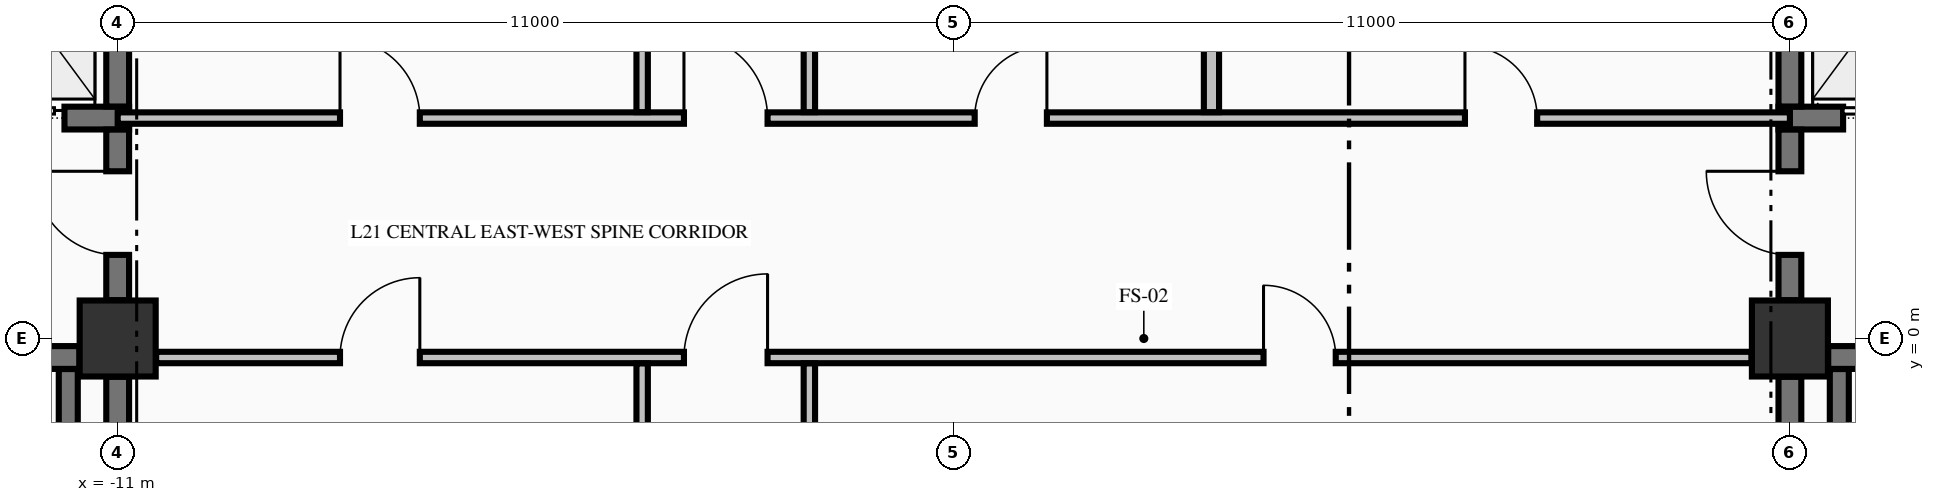
"""IFC4 building model, lengths in metres.
Left out: names, types, materials, properties, quantities, classifications, styles, units other than length and angle.
Written with IfcOpenShell. Run it as: python <this file> out.ifc"""

import sys

from ifc_helpers import new_model, si_unit, direction, frame, frame_2d, origin, origin_2d, place, context, subcontext, project, spatial, rectangle, extrude, element, fill, save


model = new_model("IFC4")
c1 = context("Model", 3, precision=1e-05, world=origin(), true_north=direction((0.0, 1.0)))
c2 = subcontext(c1, "Body", "Model", "MODEL_VIEW")
j1 = project(units=[si_unit("LENGTHUNIT", "METRE"), si_unit("PLANEANGLEUNIT", "RADIAN")], contexts=[c1])
p1 = place(None, origin())
s1 = spatial("IfcSite", under=j1, at=p1, CompositionType="ELEMENT")
p2 = place(p1, origin())
s2 = spatial("IfcBuilding", under=s1, at=p2, CompositionType="ELEMENT")
p3 = place(p2, frame((0.0, 0.0, 86.94)))
s3 = spatial("IfcBuildingStorey", under=s2, at=p3, CompositionType="ELEMENT", Elevation=86.94)
for number, where, z_axis, x_axis in (
    (1, (-11.0, 0.0, -0.425), (0.0, 0.0, 1.0), (1.0, 0.0, 0.0)),
    (2, (11.0, 0.0, -0.425), (0.0, 0.0, 1.0), (1.0, 0.0, 0.0)),
):
    element("IfcColumn", number, at=place(p3, frame(where, z_axis=z_axis, x_axis=x_axis)), inside=s3, PredefinedType="COLUMN", context=c2, shape_type="SweptSolid", body=[
        extrude(rectangle(XDim=1.0, YDim=1.0, at=origin_2d()), origin(), (0.0, 0.0, 1.0), 4.595),
    ])
p4 = place(p3, frame((-19.496, -0.25, 0.0), z_axis=(0.0, 0.0, 1.0), x_axis=(1.0, 0.0, 0.0)))
e3 = element("IfcWall", 3, at=p4, inside=s3, PredefinedType="SHEAR", context=c2, shape_type="SweptSolid", body=[
    extrude(rectangle(XDim=7.992, YDim=0.3, at=frame_2d((3.996, 0.0))), origin(), (0.0, 0.0, 1.0), 4.17),
])
p5 = place(p4, frame((5.796, 0.0, 0.0)))
e4 = element("IfcOpeningElement", 4, at=p5, cuts=e3, PredefinedType="OPENING", context=c2, shape_type="SweptSolid", body=[
    extrude(rectangle(XDim=1.1, YDim=2.15, at=frame_2d((0.55, 1.075))), frame((0.0, 0.16, 0.0), z_axis=(0.0, -1.0, 0.0), x_axis=(1.0, 0.0, 0.0)), (0.0, 0.0, 1.0), 0.32),
])
p6 = place(p3, frame((11.504, -0.25, 0.0), z_axis=(0.0, 0.0, 1.0), x_axis=(1.0, 0.0, 0.0)))
e5 = element("IfcWall", 5, at=p6, inside=s3, PredefinedType="SHEAR", context=c2, shape_type="SweptSolid", body=[
    extrude(rectangle(XDim=3.371, YDim=0.3, at=frame_2d((1.686, 0.0))), origin(), (0.0, 0.0, 1.0), 4.17),
])
p7 = place(p6, frame((1.096, 0.0, 0.0)))
e6 = element("IfcOpeningElement", 6, at=p7, cuts=e5, PredefinedType="OPENING", context=c2, shape_type="SweptSolid", body=[
    extrude(rectangle(XDim=1.1, YDim=2.15, at=frame_2d((0.55, 1.075))), frame((0.0, 0.16, 0.0), z_axis=(0.0, -1.0, 0.0), x_axis=(1.0, 0.0, 0.0)), (0.0, 0.0, 1.0), 0.32),
])
p8 = place(p3, frame((-14.875, 2.9, 0.0), z_axis=(0.0, 0.0, 1.0), x_axis=(1.0, 0.0, 0.0)))
e7 = element("IfcWall", 7, at=p8, inside=s3, PredefinedType="SHEAR", context=c2, shape_type="SweptSolid", body=[
    extrude(rectangle(XDim=4.025, YDim=0.3, at=frame_2d((2.012, 0.0))), origin(), (0.0, 0.0, 1.0), 4.17),
])
p9 = place(p8, frame((2.075, 0.0, 0.0)))
e8 = element("IfcOpeningElement", 8, at=p9, cuts=e7, PredefinedType="OPENING", context=c2, shape_type="SweptSolid", body=[
    extrude(rectangle(XDim=1.1, YDim=2.2, at=frame_2d((0.55, 1.1))), frame((0.0, 0.16, 0.0), z_axis=(0.0, -1.0, 0.0), x_axis=(1.0, 0.0, 0.0)), (0.0, 0.0, 1.0), 0.32),
])
p10 = place(p3, frame((10.85, 2.9, 0.0), z_axis=(0.0, 0.0, 1.0), x_axis=(1.0, 0.0, 0.0)))
e9 = element("IfcWall", 9, at=p10, inside=s3, PredefinedType="SHEAR", context=c2, shape_type="SweptSolid", body=[
    extrude(rectangle(XDim=4.025, YDim=0.3, at=frame_2d((2.012, 0.0))), origin(), (0.0, 0.0, 1.0), 4.17),
])
p11 = place(p10, frame((0.85, 0.0, 0.0)))
e10 = element("IfcOpeningElement", 10, at=p11, cuts=e9, PredefinedType="OPENING", context=c2, shape_type="SweptSolid", body=[
    extrude(rectangle(XDim=1.1, YDim=2.2, at=frame_2d((0.55, 1.1))), frame((0.0, 0.16, 0.0), z_axis=(0.0, -1.0, 0.0), x_axis=(1.0, 0.0, 0.0)), (0.0, 0.0, 1.0), 0.32),
])
p12 = place(p3, frame((-10.494, -0.25, 0.0), z_axis=(0.0, 0.0, 1.0), x_axis=(1.0, 0.0, 0.0)))
e11 = element("IfcWall", 11, at=p12, inside=s3, PredefinedType="PARTITIONING", context=c2, shape_type="SweptSolid", body=[
    extrude(rectangle(XDim=20.988, YDim=0.15, at=frame_2d((10.494, 0.0))), origin(), (0.0, 0.0, 1.0), 4.17),
])
p13 = place(p12, frame((6.944, 0.0, 0.0)))
e12 = element("IfcOpeningElement", 12, at=p13, cuts=e11, PredefinedType="OPENING", context=c2, shape_type="SweptSolid", body=[
    extrude(rectangle(XDim=1.1, YDim=2.15, at=frame_2d((0.55, 1.075))), frame((0.0, 0.085, 0.0), z_axis=(0.0, -1.0, 0.0), x_axis=(1.0, 0.0, 0.0)), (0.0, 0.0, 1.0), 0.17),
])
p14 = place(p12, frame((2.419, 0.0, 0.0)))
e13 = element("IfcOpeningElement", 13, at=p14, cuts=e11, PredefinedType="OPENING", context=c2, shape_type="SweptSolid", body=[
    extrude(rectangle(XDim=1.05, YDim=2.15, at=frame_2d((0.525, 1.075))), frame((0.0, 0.085, 0.0), z_axis=(0.0, -1.0, 0.0), x_axis=(1.0, 0.0, 0.0)), (0.0, 0.0, 1.0), 0.17),
])
p15 = place(p12, frame((14.569, 0.0, 0.0)))
e14 = element("IfcOpeningElement", 14, at=p15, cuts=e11, PredefinedType="OPENING", context=c2, shape_type="SweptSolid", body=[
    extrude(rectangle(XDim=0.95, YDim=2.15, at=frame_2d((0.475, 1.075))), frame((0.0, 0.085, 0.0), z_axis=(0.0, -1.0, 0.0), x_axis=(1.0, 0.0, 0.0)), (0.0, 0.0, 1.0), 0.17),
])
p16 = place(p3, frame((-11.0, 2.9, 0.0), z_axis=(0.0, 0.0, 1.0), x_axis=(1.0, 0.0, 0.0)))
e15 = element("IfcWall", 15, at=p16, inside=s3, PredefinedType="PARTITIONING", context=c2, shape_type="SweptSolid", body=[
    extrude(rectangle(XDim=22.0, YDim=0.15, at=frame_2d((11.0, 0.0))), origin(), (0.0, 0.0, 1.0), 4.17),
])
p17 = place(p16, frame((7.45, 0.0, 0.0)))
e16 = element("IfcOpeningElement", 16, at=p17, cuts=e15, PredefinedType="OPENING", context=c2, shape_type="SweptSolid", body=[
    extrude(rectangle(XDim=1.1, YDim=2.15, at=frame_2d((0.55, 1.075))), frame((0.0, 0.085, 0.0), z_axis=(0.0, -1.0, 0.0), x_axis=(1.0, 0.0, 0.0)), (0.0, 0.0, 1.0), 0.17),
])
p18 = place(p16, frame((2.925, 0.0, 0.0)))
e17 = element("IfcOpeningElement", 17, at=p18, cuts=e15, PredefinedType="OPENING", context=c2, shape_type="SweptSolid", body=[
    extrude(rectangle(XDim=1.05, YDim=2.15, at=frame_2d((0.525, 1.075))), frame((0.0, 0.085, 0.0), z_axis=(0.0, -1.0, 0.0), x_axis=(1.0, 0.0, 0.0)), (0.0, 0.0, 1.0), 0.17),
])
p19 = place(p16, frame((11.275, 0.0, 0.0)))
e18 = element("IfcOpeningElement", 18, at=p19, cuts=e15, PredefinedType="OPENING", context=c2, shape_type="SweptSolid", body=[
    extrude(rectangle(XDim=0.95, YDim=2.15, at=frame_2d((0.475, 1.075))), frame((0.0, 0.085, 0.0), z_axis=(0.0, -1.0, 0.0), x_axis=(1.0, 0.0, 0.0)), (0.0, 0.0, 1.0), 0.17),
])
p20 = place(p16, frame((17.725, 0.0, 0.0)))
e19 = element("IfcOpeningElement", 19, at=p20, cuts=e15, PredefinedType="OPENING", context=c2, shape_type="SweptSolid", body=[
    extrude(rectangle(XDim=0.95, YDim=2.15, at=frame_2d((0.475, 1.075))), frame((0.0, 0.085, 0.0), z_axis=(0.0, -1.0, 0.0), x_axis=(1.0, 0.0, 0.0)), (0.0, 0.0, 1.0), 0.17),
])
p21 = place(p3, frame((-11.65, -9.798, 0.0), z_axis=(0.0, 0.0, 1.0), x_axis=(0.0, 1.0, 0.0)))
e20 = element("IfcWall", 20, at=p21, inside=s3, PredefinedType="SOLIDWALL", context=c2, shape_type="SweptSolid", body=[
    extrude(rectangle(XDim=9.396, YDim=0.25, at=frame_2d((4.698, 0.0))), origin(), (0.0, 0.0, 1.0), 4.17),
])
p22 = place(p3, frame((-11.0, -9.446, 0.0), z_axis=(0.0, 0.0, 1.0), x_axis=(0.0, 1.0, 0.0)))
e21 = element("IfcWall", 21, at=p22, inside=s3, PredefinedType="SHEAR", context=c2, shape_type="SweptSolid", body=[
    extrude(rectangle(XDim=8.942, YDim=0.3, at=frame_2d((4.471, 0.0))), origin(), (0.0, 0.0, 1.0), 4.17),
])
p23 = place(p3, frame((-11.0, 0.504, 0.0), z_axis=(0.0, 0.0, 1.0), x_axis=(0.0, 1.0, 0.0)))
e22 = element("IfcWall", 22, at=p23, inside=s3, PredefinedType="SHEAR", context=c2, shape_type="SweptSolid", body=[
    extrude(rectangle(XDim=2.244, YDim=0.3, at=frame_2d((1.122, 0.0))), origin(), (0.0, 0.0, 1.0), 4.17),
])
p24 = place(p23, frame((0.596, 0.0, 0.0)))
e23 = element("IfcOpeningElement", 23, at=p24, cuts=e22, PredefinedType="OPENING", context=c2, shape_type="SweptSolid", body=[
    extrude(rectangle(XDim=1.1, YDim=2.15, at=frame_2d((0.55, 1.075))), frame((0.0, 0.16, 0.0), z_axis=(0.0, -1.0, 0.0), x_axis=(1.0, 0.0, 0.0)), (0.0, 0.0, 1.0), 0.32),
])
p25 = place(p3, frame((-11.0, 3.052, 0.0), z_axis=(0.0, 0.0, 1.0), x_axis=(0.0, 1.0, 0.0)))
e24 = element("IfcWall", 24, at=p25, inside=s3, PredefinedType="SHEAR", context=c2, shape_type="SweptSolid", body=[
    extrude(rectangle(XDim=2.496, YDim=0.3, at=frame_2d((1.248, 0.0))), origin(), (0.0, 0.0, 1.0), 4.17),
])
p26 = place(p3, frame((11.0, -9.446, 0.0), z_axis=(0.0, 0.0, 1.0), x_axis=(0.0, 1.0, 0.0)))
e25 = element("IfcWall", 25, at=p26, inside=s3, PredefinedType="SHEAR", context=c2, shape_type="SweptSolid", body=[
    extrude(rectangle(XDim=8.942, YDim=0.3, at=frame_2d((4.471, 0.0))), origin(), (0.0, 0.0, 1.0), 4.17),
])
p27 = place(p3, frame((11.0, 0.504, 0.0), z_axis=(0.0, 0.0, 1.0), x_axis=(0.0, 1.0, 0.0)))
e26 = element("IfcWall", 26, at=p27, inside=s3, PredefinedType="SHEAR", context=c2, shape_type="SweptSolid", body=[
    extrude(rectangle(XDim=2.244, YDim=0.3, at=frame_2d((1.122, 0.0))), origin(), (0.0, 0.0, 1.0), 4.17),
])
p28 = place(p27, frame((0.596, 0.0, 0.0)))
e27 = element("IfcOpeningElement", 27, at=p28, cuts=e26, PredefinedType="OPENING", context=c2, shape_type="SweptSolid", body=[
    extrude(rectangle(XDim=1.1, YDim=2.15, at=frame_2d((0.55, 1.075))), frame((0.0, 0.16, 0.0), z_axis=(0.0, -1.0, 0.0), x_axis=(1.0, 0.0, 0.0)), (0.0, 0.0, 1.0), 0.32),
])
p29 = place(p3, frame((11.0, 3.052, 0.0), z_axis=(0.0, 0.0, 1.0), x_axis=(0.0, 1.0, 0.0)))
e28 = element("IfcWall", 28, at=p29, inside=s3, PredefinedType="SHEAR", context=c2, shape_type="SweptSolid", body=[
    extrude(rectangle(XDim=2.496, YDim=0.3, at=frame_2d((1.248, 0.0))), origin(), (0.0, 0.0, 1.0), 4.17),
])
p30 = place(p3, frame((11.65, -9.798, 0.0), z_axis=(0.0, 0.0, 1.0), x_axis=(0.0, 1.0, 0.0)))
e29 = element("IfcWall", 29, at=p30, inside=s3, PredefinedType="SOLIDWALL", context=c2, shape_type="SweptSolid", body=[
    extrude(rectangle(XDim=9.396, YDim=0.25, at=frame_2d((4.698, 0.0))), origin(), (0.0, 0.0, 1.0), 4.17),
])
p31 = place(p3, frame((-4.1, -9.872, 0.0), z_axis=(0.0, 0.0, 1.0), x_axis=(0.0, 1.0, 0.0)))
e30 = element("IfcWall", 30, at=p31, inside=s3, PredefinedType="PARTITIONING", context=c2, shape_type="SweptSolid", body=[
    extrude(rectangle(XDim=9.544, YDim=0.15, at=frame_2d((4.772, 0.0))), origin(), (0.0, 0.0, 1.0), 4.17),
])
p32 = place(p3, frame((-4.1, 2.978, 0.0), z_axis=(0.0, 0.0, 1.0), x_axis=(0.0, 1.0, 0.0)))
e31 = element("IfcWall", 31, at=p32, inside=s3, PredefinedType="PARTITIONING", context=c2, shape_type="SweptSolid", body=[
    extrude(rectangle(XDim=7.444, YDim=0.15, at=frame_2d((3.722, 0.0))), origin(), (0.0, 0.0, 1.0), 4.17),
])
p33 = place(p3, frame((-1.9, -4.747, 0.0), z_axis=(0.0, 0.0, 1.0), x_axis=(0.0, 1.0, 0.0)))
e32 = element("IfcWall", 32, at=p33, inside=s3, PredefinedType="PARTITIONING", context=c2, shape_type="SweptSolid", body=[
    extrude(rectangle(XDim=4.419, YDim=0.15, at=frame_2d((2.209, 0.0))), origin(), (0.0, 0.0, 1.0), 4.17),
])
p34 = place(p3, frame((-1.9, 2.978, 0.0), z_axis=(0.0, 0.0, 1.0), x_axis=(0.0, 1.0, 0.0)))
e33 = element("IfcWall", 33, at=p34, inside=s3, PredefinedType="PARTITIONING", context=c2, shape_type="SweptSolid", body=[
    extrude(rectangle(XDim=7.444, YDim=0.15, at=frame_2d((3.722, 0.0))), origin(), (0.0, 0.0, 1.0), 4.17),
])
p35 = place(p3, frame((3.39, 2.978, 0.0), z_axis=(0.0, 0.0, 1.0), x_axis=(0.0, 1.0, 0.0)))
e34 = element("IfcWall", 34, at=p35, inside=s3, PredefinedType="PARTITIONING", context=c2, shape_type="SweptSolid", body=[
    extrude(rectangle(XDim=7.444, YDim=0.2, at=frame_2d((3.722, 0.0))), origin(), (0.0, 0.0, 1.0), 4.17),
])
p36 = place(p24, origin())
e35 = element("IfcDoor", 35, at=p36, inside=s3, OperationType="SINGLE_SWING_RIGHT", PredefinedType="DOOR", context=c2, shape_type="SweptSolid", body=[
    extrude(rectangle(XDim=1.1, YDim=2.15, at=frame_2d((0.55, 1.075))), frame((0.0, 0.025, 0.0), z_axis=(0.0, -1.0, 0.0), x_axis=(1.0, 0.0, 0.0)), (0.0, 0.0, 1.0), 0.05),
])
fill(e23, e35)
p37 = place(p9, origin())
e36 = element("IfcDoor", 36, at=p37, inside=s3, OperationType="SLIDING_TO_LEFT", PredefinedType="DOOR", context=c2, shape_type="SweptSolid", body=[
    extrude(rectangle(XDim=1.1, YDim=2.2, at=frame_2d((0.55, 1.1))), frame((0.0, 0.025, 0.0), z_axis=(0.0, -1.0, 0.0), x_axis=(1.0, 0.0, 0.0)), (0.0, 0.0, 1.0), 0.05),
])
fill(e8, e36)
p38 = place(p28, origin())
e37 = element("IfcDoor", 37, at=p38, inside=s3, OperationType="SINGLE_SWING_RIGHT", PredefinedType="DOOR", context=c2, shape_type="SweptSolid", body=[
    extrude(rectangle(XDim=1.1, YDim=2.15, at=frame_2d((0.55, 1.075))), frame((0.0, 0.025, 0.0), z_axis=(0.0, -1.0, 0.0), x_axis=(1.0, 0.0, 0.0)), (0.0, 0.0, 1.0), 0.05),
])
fill(e27, e37)
p39 = place(p11, origin())
e38 = element("IfcDoor", 38, at=p39, inside=s3, OperationType="SLIDING_TO_RIGHT", PredefinedType="DOOR", context=c2, shape_type="SweptSolid", body=[
    extrude(rectangle(XDim=1.1, YDim=2.2, at=frame_2d((0.55, 1.1))), frame((0.0, 0.025, 0.0), z_axis=(0.0, -1.0, 0.0), x_axis=(1.0, 0.0, 0.0)), (0.0, 0.0, 1.0), 0.05),
])
fill(e10, e38)
p40 = place(p17, origin())
e39 = element("IfcDoor", 39, at=p40, inside=s3, OperationType="SINGLE_SWING_LEFT", PredefinedType="DOOR", context=c2, shape_type="SweptSolid", body=[
    extrude(rectangle(XDim=1.1, YDim=2.15, at=frame_2d((0.55, 1.075))), frame((0.0, 0.025, 0.0), z_axis=(0.0, -1.0, 0.0), x_axis=(1.0, 0.0, 0.0)), (0.0, 0.0, 1.0), 0.05),
])
fill(e16, e39)
p41 = place(p13, origin())
e40 = element("IfcDoor", 40, at=p41, inside=s3, OperationType="SINGLE_SWING_RIGHT", PredefinedType="DOOR", context=c2, shape_type="SweptSolid", body=[
    extrude(rectangle(XDim=1.1, YDim=2.15, at=frame_2d((0.55, 1.075))), frame((0.0, 0.025, 0.0), z_axis=(0.0, -1.0, 0.0), x_axis=(1.0, 0.0, 0.0)), (0.0, 0.0, 1.0), 0.05),
])
fill(e12, e40)
p42 = place(p18, origin())
e41 = element("IfcDoor", 41, at=p42, inside=s3, OperationType="SINGLE_SWING_LEFT", PredefinedType="DOOR", context=c2, shape_type="SweptSolid", body=[
    extrude(rectangle(XDim=1.05, YDim=2.15, at=frame_2d((0.525, 1.075))), frame((0.0, 0.025, 0.0), z_axis=(0.0, -1.0, 0.0), x_axis=(1.0, 0.0, 0.0)), (0.0, 0.0, 1.0), 0.05),
])
fill(e17, e41)
p43 = place(p19, origin())
e42 = element("IfcDoor", 42, at=p43, inside=s3, OperationType="SINGLE_SWING_RIGHT", PredefinedType="DOOR", context=c2, shape_type="SweptSolid", body=[
    extrude(rectangle(XDim=0.95, YDim=2.15, at=frame_2d((0.475, 1.075))), frame((0.0, 0.025, 0.0), z_axis=(0.0, -1.0, 0.0), x_axis=(1.0, 0.0, 0.0)), (0.0, 0.0, 1.0), 0.05),
])
fill(e18, e42)
p44 = place(p20, origin())
e43 = element("IfcDoor", 43, at=p44, inside=s3, OperationType="SINGLE_SWING_LEFT", PredefinedType="DOOR", context=c2, shape_type="SweptSolid", body=[
    extrude(rectangle(XDim=0.95, YDim=2.15, at=frame_2d((0.475, 1.075))), frame((0.0, 0.025, 0.0), z_axis=(0.0, -1.0, 0.0), x_axis=(1.0, 0.0, 0.0)), (0.0, 0.0, 1.0), 0.05),
])
fill(e19, e43)
p45 = place(p14, origin())
e44 = element("IfcDoor", 44, at=p45, inside=s3, OperationType="SINGLE_SWING_RIGHT", PredefinedType="DOOR", context=c2, shape_type="SweptSolid", body=[
    extrude(rectangle(XDim=1.05, YDim=2.15, at=frame_2d((0.525, 1.075))), frame((0.0, 0.025, 0.0), z_axis=(0.0, -1.0, 0.0), x_axis=(1.0, 0.0, 0.0)), (0.0, 0.0, 1.0), 0.05),
])
fill(e13, e44)
p46 = place(p15, origin())
e45 = element("IfcDoor", 45, at=p46, inside=s3, OperationType="SINGLE_SWING_LEFT", PredefinedType="DOOR", context=c2, shape_type="SweptSolid", body=[
    extrude(rectangle(XDim=0.95, YDim=2.15, at=frame_2d((0.475, 1.075))), frame((0.0, 0.025, 0.0), z_axis=(0.0, -1.0, 0.0), x_axis=(1.0, 0.0, 0.0)), (0.0, 0.0, 1.0), 0.05),
])
fill(e14, e45)
save(model, sys.argv[1])
